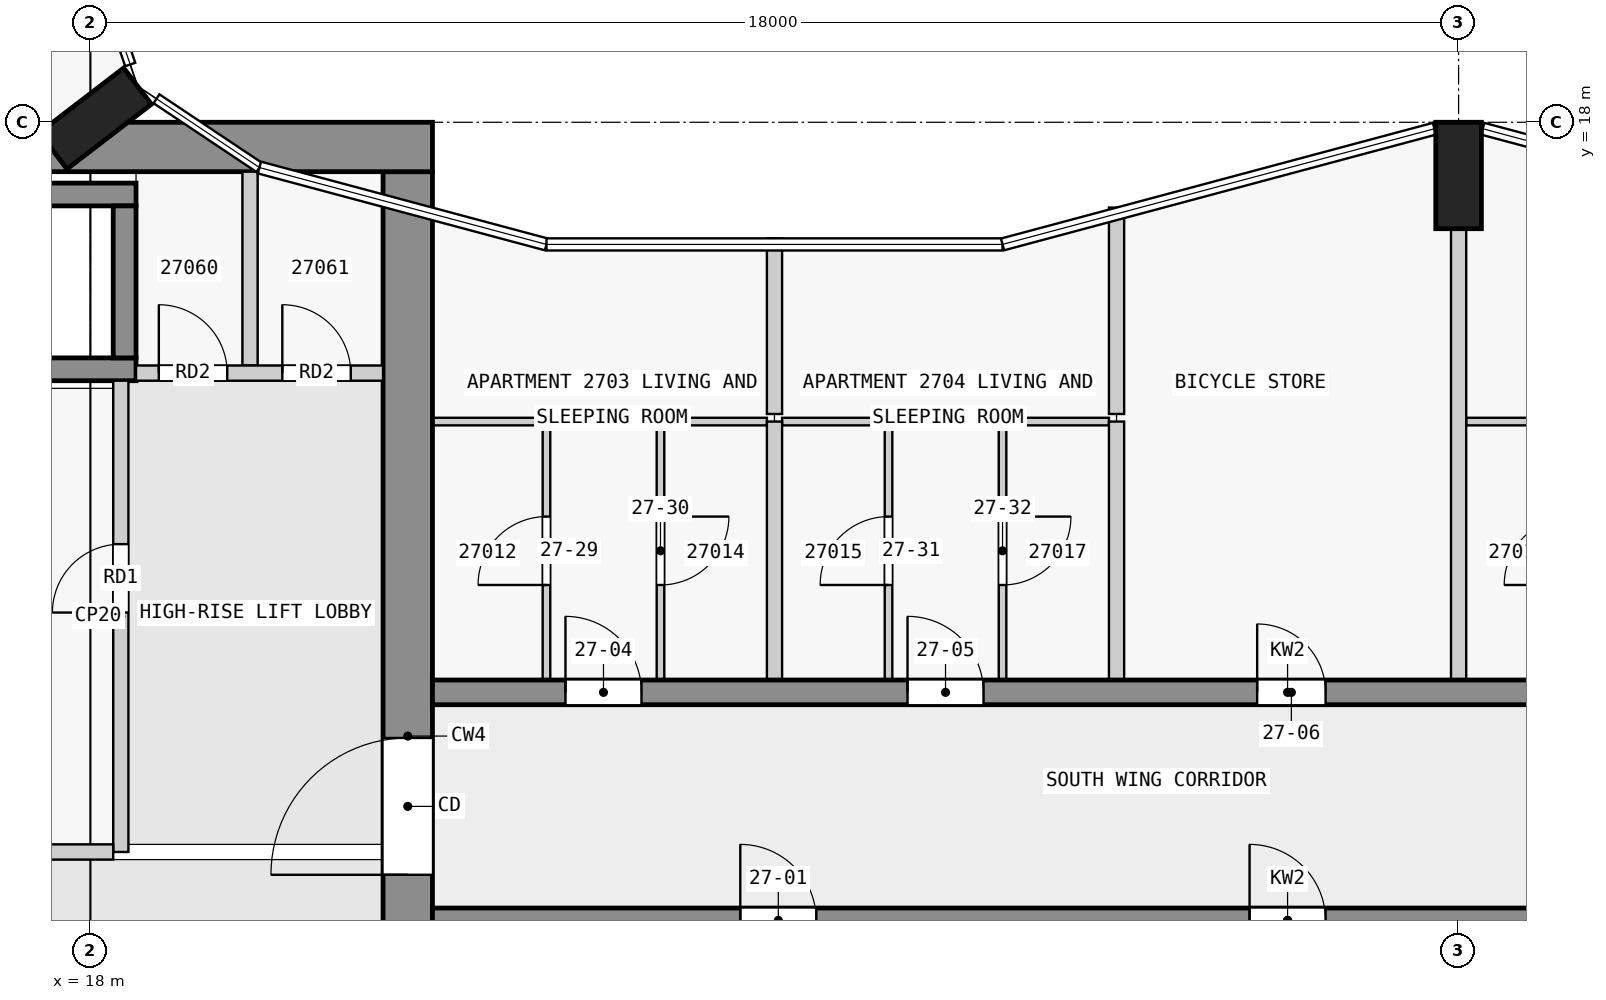
"""IFC4 building model, lengths in metres.
Left out: names, types, materials, properties, quantities, classifications, styles, units other than length and angle.
Written with IfcOpenShell. Run it as: python <this file> out.ifc"""

import sys

from ifc_helpers import new_model, si_unit, direction, frame, frame_2d, origin, origin_2d, place, context, subcontext, project, spatial, rectangle, extrude, element, fill, save


model = new_model("IFC4")
c1 = context("Model", 3, precision=1e-05, world=origin(), true_north=direction((0.0, 1.0)))
c2 = subcontext(c1, "Body", "Model", "MODEL_VIEW")
j1 = project(units=[si_unit("LENGTHUNIT", "METRE"), si_unit("PLANEANGLEUNIT", "RADIAN")], contexts=[c1])
p1 = place(None, origin())
s1 = spatial("IfcSite", under=j1, at=p1, CompositionType="ELEMENT")
p2 = place(p1, origin())
s2 = spatial("IfcBuilding", under=s1, at=p2, CompositionType="ELEMENT")
p3 = place(p2, frame((0.0, 0.0, 106.3)))
s3 = spatial("IfcBuildingStorey", under=s2, at=p3, CompositionType="ELEMENT", Elevation=106.3)
for number, where, z_axis, x_axis in (
    (1, (36.0, 17.3, 0.0), (0.0, 0.0, 1.0), (1.0, 0.0, 0.0)),
    (2, (18.065, 18.05, 0.0), (0.0, 0.0, 1.0), (-0.609, 0.793, 0.0)),
):
    element("IfcColumn", number, at=place(p3, frame(where, z_axis=z_axis, x_axis=x_axis)), inside=s3, PredefinedType="COLUMN", context=c2, shape_type="SweptSolid", body=[
        extrude(rectangle(XDim=0.6, YDim=1.4, at=origin_2d()), origin(), (0.0, 0.0, 1.0), 3.5),
    ])
p4 = place(p3, frame((1.65, 17.675, 0.0), z_axis=(0.0, 0.0, 1.0), x_axis=(1.0, 0.0, 0.0)))
e3 = element("IfcWall", 3, at=p4, inside=s3, PredefinedType="SHEAR", context=c2, shape_type="SweptSolid", body=[
    extrude(rectangle(XDim=20.85, YDim=0.65, at=frame_2d((10.425, 0.0))), origin(), (0.0, 0.0, 1.0), 3.25),
])
p5 = place(p4, frame((6.45, 0.0, 0.0)))
e4 = element("IfcOpeningElement", 4, at=p5, cuts=e3, PredefinedType="OPENING", context=c2, shape_type="SweptSolid", body=[
    extrude(rectangle(XDim=1.8, YDim=2.1, at=frame_2d((0.9, 1.05))), frame((0.0, 0.335, 0.0), z_axis=(0.0, -1.0, 0.0), x_axis=(1.0, 0.0, 0.0)), (0.0, 0.0, 1.0), 0.67),
])
p6 = place(p3, frame((22.175, 2.5, 0.0), z_axis=(0.0, 0.0, 1.0), x_axis=(0.0, 1.0, 0.0)))
e5 = element("IfcWall", 5, at=p6, inside=s3, PredefinedType="SHEAR", context=c2, shape_type="SweptSolid", body=[
    extrude(rectangle(XDim=14.85, YDim=0.65, at=frame_2d((7.425, 0.0))), origin(), (0.0, 0.0, 1.0), 3.25),
])
p7 = place(p6, frame((5.6, 0.0, 0.0)))
e6 = element("IfcOpeningElement", 6, at=p7, cuts=e5, PredefinedType="OPENING", context=c2, shape_type="SweptSolid", body=[
    extrude(rectangle(XDim=1.8, YDim=2.1, at=frame_2d((0.9, 1.05))), frame((0.0, 0.335, 0.0), z_axis=(0.0, -1.0, 0.0), x_axis=(1.0, 0.0, 0.0)), (0.0, 0.0, 1.0), 0.67),
])
for number, where, z_axis, x_axis in (
    (7, (10.8, 17.05, 0.0), (0.0, 0.0, 1.0), (1.0, 0.0, 0.0)),
    (8, (10.8, 14.75, 0.0), (0.0, 0.0, 1.0), (1.0, 0.0, 0.0)),
):
    element("IfcWall", number, at=place(p3, frame(where, z_axis=z_axis, x_axis=x_axis)), inside=s3, PredefinedType="SHEAR", context=c2, shape_type="SweptSolid", body=[
        extrude(rectangle(XDim=7.8, YDim=0.3, at=frame_2d((3.9, 0.0))), origin(), (0.0, 0.0, 1.0), 3.25),
    ])
p8 = place(p3, frame((18.45, 14.9, 0.0), z_axis=(0.0, 0.0, 1.0), x_axis=(0.0, 1.0, 0.0)))
e9 = element("IfcWall", 9, at=p8, inside=s3, PredefinedType="SHEAR", context=c2, shape_type="SweptSolid", body=[
    extrude(rectangle(XDim=2.0, YDim=0.3, at=frame_2d((1.0, 0.0))), origin(), (0.0, 0.0, 1.0), 3.25),
])
p9 = place(p3, frame((22.5, 7.5, 0.0), z_axis=(0.0, 0.0, 1.0), x_axis=(1.0, 0.0, 0.0)))
e10 = element("IfcWall", 10, at=p9, inside=s3, PredefinedType="SHEAR", context=c2, shape_type="SweptSolid", body=[
    extrude(rectangle(XDim=22.5, YDim=0.325, at=frame_2d((11.25, 0.0))), origin(), (0.0, 0.0, 1.0), 3.25),
])
p10 = place(p9, frame((4.05, 0.0, 0.0)))
e11 = element("IfcOpeningElement", 11, at=p10, cuts=e10, PredefinedType="OPENING", context=c2, shape_type="SweptSolid", body=[
    extrude(rectangle(XDim=1.0, YDim=2.1, at=frame_2d((0.5, 1.05))), frame((0.0, 0.172, 0.0), z_axis=(0.0, -1.0, 0.0), x_axis=(1.0, 0.0, 0.0)), (0.0, 0.0, 1.0), 0.345),
])
p11 = place(p9, frame((10.75, 0.0, 0.0)))
e12 = element("IfcOpeningElement", 12, at=p11, cuts=e10, PredefinedType="OPENING", context=c2, shape_type="SweptSolid", body=[
    extrude(rectangle(XDim=1.0, YDim=2.1, at=frame_2d((0.5, 1.05))), frame((0.0, 0.172, 0.0), z_axis=(0.0, -1.0, 0.0), x_axis=(1.0, 0.0, 0.0)), (0.0, 0.0, 1.0), 0.345),
])
p12 = place(p9, frame((16.85, 0.0, 0.0)))
e13 = element("IfcOpeningElement", 13, at=p12, cuts=e10, PredefinedType="OPENING", context=c2, shape_type="SweptSolid", body=[
    extrude(rectangle(XDim=1.0, YDim=2.1, at=frame_2d((0.5, 1.05))), frame((0.0, 0.172, 0.0), z_axis=(0.0, -1.0, 0.0), x_axis=(1.0, 0.0, 0.0)), (0.0, 0.0, 1.0), 0.345),
])
p13 = place(p3, frame((22.5, 10.5, 0.0), z_axis=(0.0, 0.0, 1.0), x_axis=(1.0, 0.0, 0.0)))
e14 = element("IfcWall", 14, at=p13, inside=s3, PredefinedType="SHEAR", context=c2, shape_type="SweptSolid", body=[
    extrude(rectangle(XDim=22.5, YDim=0.325, at=frame_2d((11.25, 0.0))), origin(), (0.0, 0.0, 1.0), 3.25),
])
p14 = place(p13, frame((1.75, 0.0, 0.0)))
e15 = element("IfcOpeningElement", 15, at=p14, cuts=e14, PredefinedType="OPENING", context=c2, shape_type="SweptSolid", body=[
    extrude(rectangle(XDim=1.0, YDim=2.1, at=frame_2d((0.5, 1.05))), frame((0.0, 0.172, 0.0), z_axis=(0.0, -1.0, 0.0), x_axis=(1.0, 0.0, 0.0)), (0.0, 0.0, 1.0), 0.345),
])
p15 = place(p13, frame((6.25, 0.0, 0.0)))
e16 = element("IfcOpeningElement", 16, at=p15, cuts=e14, PredefinedType="OPENING", context=c2, shape_type="SweptSolid", body=[
    extrude(rectangle(XDim=1.0, YDim=2.1, at=frame_2d((0.5, 1.05))), frame((0.0, 0.172, 0.0), z_axis=(0.0, -1.0, 0.0), x_axis=(1.0, 0.0, 0.0)), (0.0, 0.0, 1.0), 0.345),
])
p16 = place(p13, frame((10.85, 0.0, 0.0)))
e17 = element("IfcOpeningElement", 17, at=p16, cuts=e14, PredefinedType="OPENING", context=c2, shape_type="SweptSolid", body=[
    extrude(rectangle(XDim=0.9, YDim=2.1, at=frame_2d((0.45, 1.05))), frame((0.0, 0.172, 0.0), z_axis=(0.0, -1.0, 0.0), x_axis=(1.0, 0.0, 0.0)), (0.0, 0.0, 1.0), 0.345),
])
p17 = place(p13, frame((15.25, 0.0, 0.0)))
e18 = element("IfcOpeningElement", 18, at=p17, cuts=e14, PredefinedType="OPENING", context=c2, shape_type="SweptSolid", body=[
    extrude(rectangle(XDim=1.0, YDim=2.1, at=frame_2d((0.5, 1.05))), frame((0.0, 0.172, 0.0), z_axis=(0.0, -1.0, 0.0), x_axis=(1.0, 0.0, 0.0)), (0.0, 0.0, 1.0), 0.345),
])
p18 = place(p13, frame((18.75, 0.0, 0.0)))
e19 = element("IfcOpeningElement", 19, at=p18, cuts=e14, PredefinedType="OPENING", context=c2, shape_type="SweptSolid", body=[
    extrude(rectangle(XDim=0.9, YDim=2.1, at=frame_2d((0.45, 1.05))), frame((0.0, 0.172, 0.0), z_axis=(0.0, -1.0, 0.0), x_axis=(1.0, 0.0, 0.0)), (0.0, 0.0, 1.0), 0.345),
])
p19 = place(p13, frame((20.95, 0.0, 0.0)))
e20 = element("IfcOpeningElement", 20, at=p19, cuts=e14, PredefinedType="OPENING", context=c2, shape_type="SweptSolid", body=[
    extrude(rectangle(XDim=1.0, YDim=2.1, at=frame_2d((0.5, 1.05))), frame((0.0, 0.172, 0.0), z_axis=(0.0, -1.0, 0.0), x_axis=(1.0, 0.0, 0.0)), (0.0, 0.0, 1.0), 0.345),
])
p20 = place(p3, frame((10.9, 8.4, 0.0), z_axis=(0.0, 0.0, 1.0), x_axis=(1.0, 0.0, 0.0)))
e21 = element("IfcWall", 21, at=p20, inside=s3, PredefinedType="PARTITIONING", context=c2, shape_type="SweptSolid", body=[
    extrude(rectangle(XDim=7.4, YDim=0.2, at=frame_2d((3.7, 0.0))), origin(), (0.0, 0.0, 1.0), 3.25),
])
p21 = place(p3, frame((18.4, 8.4, 0.0), z_axis=(0.0, 0.0, 1.0), x_axis=(0.0, 1.0, 0.0)))
e22 = element("IfcWall", 22, at=p21, inside=s3, PredefinedType="PARTITIONING", context=c2, shape_type="SweptSolid", body=[
    extrude(rectangle(XDim=6.2, YDim=0.2, at=frame_2d((3.1, 0.0))), origin(), (0.0, 0.0, 1.0), 3.25),
])
p22 = place(p21, frame((3.15, 0.0, 0.0)))
e23 = element("IfcOpeningElement", 23, at=p22, cuts=e22, PredefinedType="OPENING", context=c2, shape_type="SweptSolid", body=[
    extrude(rectangle(XDim=0.9, YDim=2.1, at=frame_2d((0.45, 1.05))), frame((0.0, 0.11, 0.0), z_axis=(0.0, -1.0, 0.0), x_axis=(1.0, 0.0, 0.0)), (0.0, 0.0, 1.0), 0.22),
])
p23 = place(p3, frame((18.6, 14.7, 0.0), z_axis=(0.0, 0.0, 1.0), x_axis=(1.0, 0.0, 0.0)))
e24 = element("IfcWall", 24, at=p23, inside=s3, PredefinedType="PARTITIONING", context=c2, shape_type="SweptSolid", body=[
    extrude(rectangle(XDim=3.25, YDim=0.2, at=frame_2d((1.625, 0.0))), origin(), (0.0, 0.0, 1.0), 3.25),
])
p24 = place(p23, frame((0.3, 0.0, 0.0)))
e25 = element("IfcOpeningElement", 25, at=p24, cuts=e24, PredefinedType="OPENING", context=c2, shape_type="SweptSolid", body=[
    extrude(rectangle(XDim=0.9, YDim=2.1, at=frame_2d((0.45, 1.05))), frame((0.0, 0.11, 0.0), z_axis=(0.0, -1.0, 0.0), x_axis=(1.0, 0.0, 0.0)), (0.0, 0.0, 1.0), 0.22),
])
p25 = place(p23, frame((1.925, 0.0, 0.0)))
e26 = element("IfcOpeningElement", 26, at=p25, cuts=e24, PredefinedType="OPENING", context=c2, shape_type="SweptSolid", body=[
    extrude(rectangle(XDim=0.9, YDim=2.1, at=frame_2d((0.45, 1.05))), frame((0.0, 0.11, 0.0), z_axis=(0.0, -1.0, 0.0), x_axis=(1.0, 0.0, 0.0)), (0.0, 0.0, 1.0), 0.22),
])
p26 = place(p3, frame((20.1, 14.8, 0.0), z_axis=(0.0, 0.0, 1.0), x_axis=(0.0, 1.0, 0.0)))
e27 = element("IfcWall", 27, at=p26, inside=s3, PredefinedType="PARTITIONING", context=c2, shape_type="SweptSolid", body=[
    extrude(rectangle(XDim=2.55, YDim=0.2, at=frame_2d((1.275, 0.0))), origin(), (0.0, 0.0, 1.0), 3.25),
])
p27 = place(p3, frame((23.95, 14.062, 0.0), z_axis=(0.0, 0.0, 1.0), x_axis=(-1.0, 0.0, 0.0)))
e28 = element("IfcWall", 28, at=p27, inside=s3, PredefinedType="PARTITIONING", context=c2, shape_type="SweptSolid", body=[
    extrude(rectangle(XDim=1.45, YDim=0.1, at=frame_2d((0.725, 0.0))), origin(), (0.0, 0.0, 1.0), 3.25),
])
for number, where, z_axis, x_axis in (
    (29, (26.9, 14.062, 0.0), (0.0, 0.0, 1.0), (-1.0, 0.0, 0.0)),
    (30, (28.45, 14.062, 0.0), (0.0, 0.0, 1.0), (-1.0, 0.0, 0.0)),
    (31, (31.4, 14.062, 0.0), (0.0, 0.0, 1.0), (-1.0, 0.0, 0.0)),
    (32, (37.45, 14.062, 0.0), (0.0, 0.0, 1.0), (-1.0, 0.0, 0.0)),
):
    element("IfcWall", number, at=place(p3, frame(where, z_axis=z_axis, x_axis=x_axis)), inside=s3, PredefinedType="PARTITIONING", context=c2, shape_type="SweptSolid", body=[
        extrude(rectangle(XDim=1.35, YDim=0.1, at=frame_2d((0.675, 0.0))), origin(), (0.0, 0.0, 1.0), 3.25),
    ])
p28 = place(p3, frame((24.0, 10.663, 0.0), z_axis=(0.0, 0.0, 1.0), x_axis=(0.0, 1.0, 0.0)))
e33 = element("IfcWall", 33, at=p28, inside=s3, PredefinedType="PARTITIONING", context=c2, shape_type="SweptSolid", body=[
    extrude(rectangle(XDim=3.4, YDim=0.1, at=frame_2d((1.7, 0.0))), origin(), (0.0, 0.0, 1.0), 3.25),
])
p29 = place(p28, frame((1.25, 0.0, 0.0)))
e34 = element("IfcOpeningElement", 34, at=p29, cuts=e33, PredefinedType="OPENING", context=c2, shape_type="SweptSolid", body=[
    extrude(rectangle(XDim=0.9, YDim=2.1, at=frame_2d((0.45, 1.05))), frame((0.0, 0.06, 0.0), z_axis=(0.0, -1.0, 0.0), x_axis=(1.0, 0.0, 0.0)), (0.0, 0.0, 1.0), 0.12),
])
p30 = place(p3, frame((25.5, 14.062, 0.0), z_axis=(0.0, 0.0, 1.0), x_axis=(0.0, -1.0, 0.0)))
e35 = element("IfcWall", 35, at=p30, inside=s3, PredefinedType="PARTITIONING", context=c2, shape_type="SweptSolid", body=[
    extrude(rectangle(XDim=3.4, YDim=0.1, at=frame_2d((1.7, 0.0))), origin(), (0.0, 0.0, 1.0), 3.25),
])
p31 = place(p30, frame((1.25, 0.0, 0.0)))
e36 = element("IfcOpeningElement", 36, at=p31, cuts=e35, PredefinedType="OPENING", context=c2, shape_type="SweptSolid", body=[
    extrude(rectangle(XDim=0.9, YDim=2.1, at=frame_2d((0.45, 1.05))), frame((0.0, 0.06, 0.0), z_axis=(0.0, -1.0, 0.0), x_axis=(1.0, 0.0, 0.0)), (0.0, 0.0, 1.0), 0.12),
])
p32 = place(p3, frame((27.0, 16.473, 0.0), z_axis=(0.0, 0.0, 1.0), x_axis=(0.0, -1.0, 0.0)))
e37 = element("IfcWall", 37, at=p32, inside=s3, PredefinedType="PARTITIONING", context=c2, shape_type="SweptSolid", body=[
    extrude(rectangle(XDim=2.311, YDim=0.2, at=frame_2d((1.155, 0.0))), origin(), (0.0, 0.0, 1.0), 3.25),
])
p33 = place(p3, frame((27.0, 10.663, 0.0), z_axis=(0.0, 0.0, 1.0), x_axis=(0.0, 1.0, 0.0)))
e38 = element("IfcWall", 38, at=p33, inside=s3, PredefinedType="PARTITIONING", context=c2, shape_type="SweptSolid", body=[
    extrude(rectangle(XDim=3.4, YDim=0.2, at=frame_2d((1.7, 0.0))), origin(), (0.0, 0.0, 1.0), 3.25),
])
p34 = place(p3, frame((28.5, 10.663, 0.0), z_axis=(0.0, 0.0, 1.0), x_axis=(0.0, 1.0, 0.0)))
e39 = element("IfcWall", 39, at=p34, inside=s3, PredefinedType="PARTITIONING", context=c2, shape_type="SweptSolid", body=[
    extrude(rectangle(XDim=3.4, YDim=0.1, at=frame_2d((1.7, 0.0))), origin(), (0.0, 0.0, 1.0), 3.25),
])
p35 = place(p34, frame((1.25, 0.0, 0.0)))
e40 = element("IfcOpeningElement", 40, at=p35, cuts=e39, PredefinedType="OPENING", context=c2, shape_type="SweptSolid", body=[
    extrude(rectangle(XDim=0.9, YDim=2.1, at=frame_2d((0.45, 1.05))), frame((0.0, 0.06, 0.0), z_axis=(0.0, -1.0, 0.0), x_axis=(1.0, 0.0, 0.0)), (0.0, 0.0, 1.0), 0.12),
])
p36 = place(p3, frame((30.0, 14.062, 0.0), z_axis=(0.0, 0.0, 1.0), x_axis=(0.0, -1.0, 0.0)))
e41 = element("IfcWall", 41, at=p36, inside=s3, PredefinedType="PARTITIONING", context=c2, shape_type="SweptSolid", body=[
    extrude(rectangle(XDim=3.4, YDim=0.1, at=frame_2d((1.7, 0.0))), origin(), (0.0, 0.0, 1.0), 3.25),
])
p37 = place(p36, frame((1.25, 0.0, 0.0)))
e42 = element("IfcOpeningElement", 42, at=p37, cuts=e41, PredefinedType="OPENING", context=c2, shape_type="SweptSolid", body=[
    extrude(rectangle(XDim=0.9, YDim=2.1, at=frame_2d((0.45, 1.05))), frame((0.0, 0.06, 0.0), z_axis=(0.0, -1.0, 0.0), x_axis=(1.0, 0.0, 0.0)), (0.0, 0.0, 1.0), 0.12),
])
p38 = place(p3, frame((31.5, 16.878, 0.0), z_axis=(0.0, 0.0, 1.0), x_axis=(0.0, -1.0, 0.0)))
e43 = element("IfcWall", 43, at=p38, inside=s3, PredefinedType="PARTITIONING", context=c2, shape_type="SweptSolid", body=[
    extrude(rectangle(XDim=2.715, YDim=0.2, at=frame_2d((1.357, 0.0))), origin(), (0.0, 0.0, 1.0), 3.25),
])
p39 = place(p3, frame((31.5, 10.663, 0.0), z_axis=(0.0, 0.0, 1.0), x_axis=(0.0, 1.0, 0.0)))
e44 = element("IfcWall", 44, at=p39, inside=s3, PredefinedType="PARTITIONING", context=c2, shape_type="SweptSolid", body=[
    extrude(rectangle(XDim=3.4, YDim=0.2, at=frame_2d((1.7, 0.0))), origin(), (0.0, 0.0, 1.0), 3.25),
])
p40 = place(p3, frame((36.0, 10.663, 0.0), z_axis=(0.0, 0.0, 1.0), x_axis=(0.0, 1.0, 0.0)))
e45 = element("IfcWall", 45, at=p40, inside=s3, PredefinedType="PARTITIONING", context=c2, shape_type="SweptSolid", body=[
    extrude(rectangle(XDim=5.938, YDim=0.2, at=frame_2d((2.969, 0.0))), origin(), (0.0, 0.0, 1.0), 3.25),
])
p41 = place(p22, origin())
e46 = element("IfcDoor", 46, at=p41, inside=s3, OperationType="SINGLE_SWING_LEFT", PredefinedType="DOOR", context=c2, shape_type="SweptSolid", body=[
    extrude(rectangle(XDim=0.9, YDim=2.1, at=frame_2d((0.45, 1.05))), frame((0.0, 0.025, 0.0), z_axis=(0.0, -1.0, 0.0), x_axis=(1.0, 0.0, 0.0)), (0.0, 0.0, 1.0), 0.05),
])
fill(e23, e46)
p42 = place(p7, origin())
e47 = element("IfcDoor", 47, at=p42, inside=s3, OperationType="DOUBLE_DOOR_SINGLE_SWING", PredefinedType="DOOR", context=c2, shape_type="SweptSolid", body=[
    extrude(rectangle(XDim=1.8, YDim=2.1, at=frame_2d((0.9, 1.05))), frame((0.0, 0.025, 0.0), z_axis=(0.0, -1.0, 0.0), x_axis=(1.0, 0.0, 0.0)), (0.0, 0.0, 1.0), 0.05),
])
fill(e6, e47)
p43 = place(p24, origin())
e48 = element("IfcDoor", 48, at=p43, inside=s3, OperationType="SINGLE_SWING_LEFT", PredefinedType="DOOR", context=c2, shape_type="SweptSolid", body=[
    extrude(rectangle(XDim=0.9, YDim=2.1, at=frame_2d((0.45, 1.05))), frame((0.0, 0.025, 0.0), z_axis=(0.0, -1.0, 0.0), x_axis=(1.0, 0.0, 0.0)), (0.0, 0.0, 1.0), 0.05),
])
fill(e25, e48)
p44 = place(p25, origin())
e49 = element("IfcDoor", 49, at=p44, inside=s3, OperationType="SINGLE_SWING_LEFT", PredefinedType="DOOR", context=c2, shape_type="SweptSolid", body=[
    extrude(rectangle(XDim=0.9, YDim=2.1, at=frame_2d((0.45, 1.05))), frame((0.0, 0.025, 0.0), z_axis=(0.0, -1.0, 0.0), x_axis=(1.0, 0.0, 0.0)), (0.0, 0.0, 1.0), 0.05),
])
fill(e26, e49)
p45 = place(p10, origin())
e50 = element("IfcDoor", 50, at=p45, inside=s3, OperationType="SINGLE_SWING_LEFT", PredefinedType="DOOR", context=c2, shape_type="SweptSolid", body=[
    extrude(rectangle(XDim=1.0, YDim=2.1, at=frame_2d((0.5, 1.05))), frame((0.0, 0.025, 0.0), z_axis=(0.0, -1.0, 0.0), x_axis=(1.0, 0.0, 0.0)), (0.0, 0.0, 1.0), 0.05),
])
fill(e11, e50)
p46 = place(p11, origin())
e51 = element("IfcDoor", 51, at=p46, inside=s3, OperationType="SINGLE_SWING_LEFT", PredefinedType="DOOR", context=c2, shape_type="SweptSolid", body=[
    extrude(rectangle(XDim=1.0, YDim=2.1, at=frame_2d((0.5, 1.05))), frame((0.0, 0.025, 0.0), z_axis=(0.0, -1.0, 0.0), x_axis=(1.0, 0.0, 0.0)), (0.0, 0.0, 1.0), 0.05),
])
fill(e12, e51)
p47 = place(p14, origin())
e52 = element("IfcDoor", 52, at=p47, inside=s3, OperationType="SINGLE_SWING_LEFT", PredefinedType="DOOR", context=c2, shape_type="SweptSolid", body=[
    extrude(rectangle(XDim=1.0, YDim=2.1, at=frame_2d((0.5, 1.05))), frame((0.0, 0.025, 0.0), z_axis=(0.0, -1.0, 0.0), x_axis=(1.0, 0.0, 0.0)), (0.0, 0.0, 1.0), 0.05),
])
fill(e15, e52)
p48 = place(p15, origin())
e53 = element("IfcDoor", 53, at=p48, inside=s3, OperationType="SINGLE_SWING_LEFT", PredefinedType="DOOR", context=c2, shape_type="SweptSolid", body=[
    extrude(rectangle(XDim=1.0, YDim=2.1, at=frame_2d((0.5, 1.05))), frame((0.0, 0.025, 0.0), z_axis=(0.0, -1.0, 0.0), x_axis=(1.0, 0.0, 0.0)), (0.0, 0.0, 1.0), 0.05),
])
fill(e16, e53)
p49 = place(p16, origin())
e54 = element("IfcDoor", 54, at=p49, inside=s3, OperationType="SINGLE_SWING_RIGHT", PredefinedType="DOOR", context=c2, shape_type="SweptSolid", body=[
    extrude(rectangle(XDim=0.9, YDim=2.1, at=frame_2d((0.45, 1.05))), frame((0.0, 0.025, 0.0), z_axis=(0.0, -1.0, 0.0), x_axis=(1.0, 0.0, 0.0)), (0.0, 0.0, 1.0), 0.05),
])
fill(e17, e54)
p50 = place(p29, origin())
e55 = element("IfcDoor", 55, at=p50, inside=s3, OperationType="SINGLE_SWING_LEFT", PredefinedType="DOOR", context=c2, shape_type="SweptSolid", body=[
    extrude(rectangle(XDim=0.9, YDim=2.1, at=frame_2d((0.45, 1.05))), frame((0.0, 0.025, 0.0), z_axis=(0.0, -1.0, 0.0), x_axis=(1.0, 0.0, 0.0)), (0.0, 0.0, 1.0), 0.05),
])
fill(e34, e55)
p51 = place(p31, origin())
e56 = element("IfcDoor", 56, at=p51, inside=s3, OperationType="SINGLE_SWING_LEFT", PredefinedType="DOOR", context=c2, shape_type="SweptSolid", body=[
    extrude(rectangle(XDim=0.9, YDim=2.1, at=frame_2d((0.45, 1.05))), frame((0.0, 0.025, 0.0), z_axis=(0.0, -1.0, 0.0), x_axis=(1.0, 0.0, 0.0)), (0.0, 0.0, 1.0), 0.05),
])
fill(e36, e56)
p52 = place(p35, origin())
e57 = element("IfcDoor", 57, at=p52, inside=s3, OperationType="SINGLE_SWING_LEFT", PredefinedType="DOOR", context=c2, shape_type="SweptSolid", body=[
    extrude(rectangle(XDim=0.9, YDim=2.1, at=frame_2d((0.45, 1.05))), frame((0.0, 0.025, 0.0), z_axis=(0.0, -1.0, 0.0), x_axis=(1.0, 0.0, 0.0)), (0.0, 0.0, 1.0), 0.05),
])
fill(e40, e57)
p53 = place(p37, origin())
e58 = element("IfcDoor", 58, at=p53, inside=s3, OperationType="SINGLE_SWING_LEFT", PredefinedType="DOOR", context=c2, shape_type="SweptSolid", body=[
    extrude(rectangle(XDim=0.9, YDim=2.1, at=frame_2d((0.45, 1.05))), frame((0.0, 0.025, 0.0), z_axis=(0.0, -1.0, 0.0), x_axis=(1.0, 0.0, 0.0)), (0.0, 0.0, 1.0), 0.05),
])
fill(e42, e58)
save(model, sys.argv[1])
